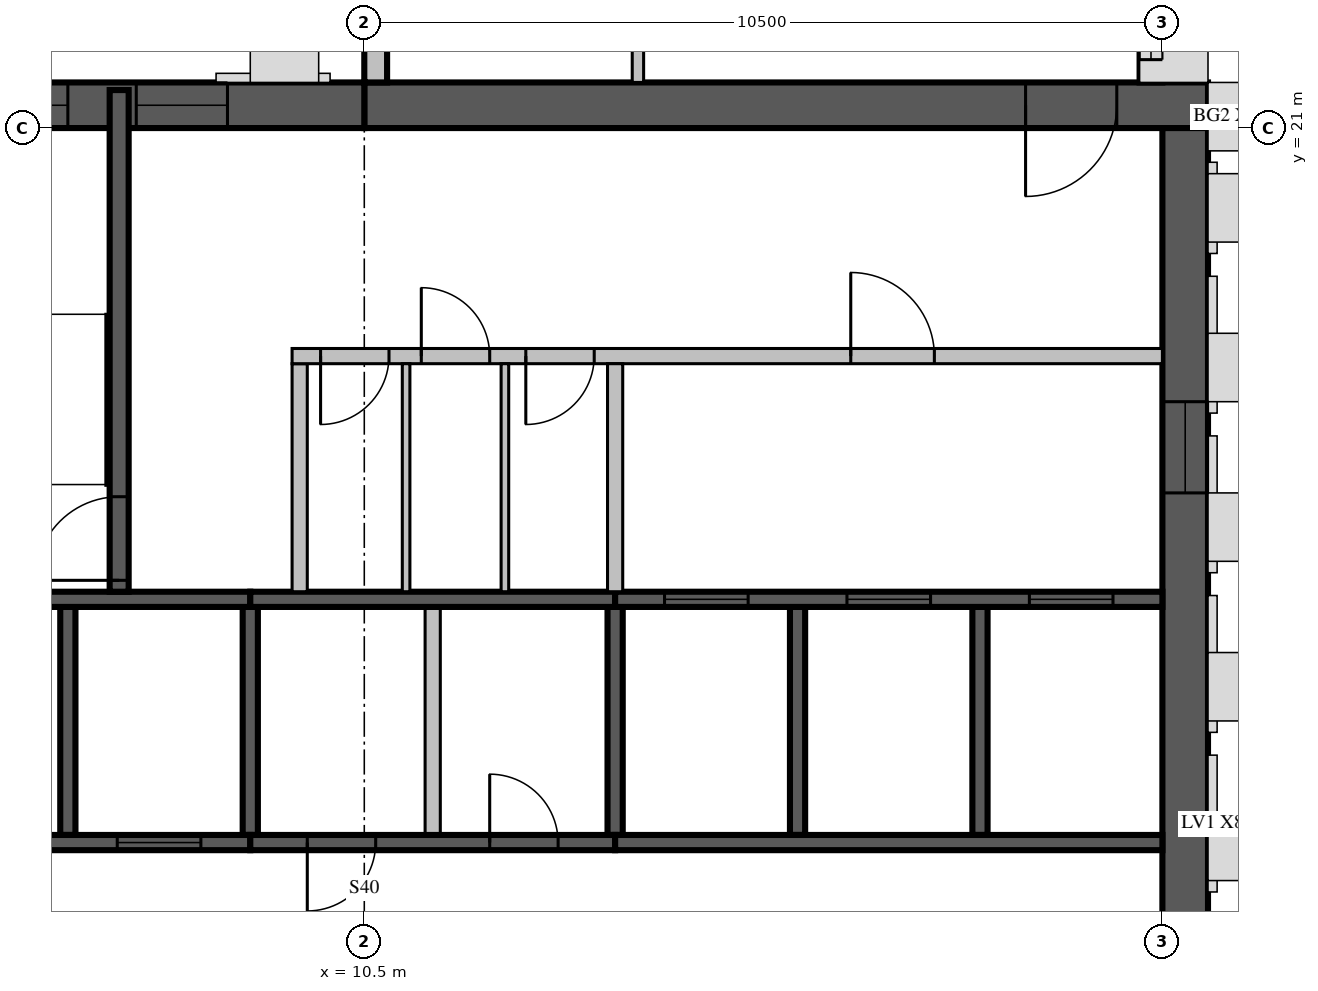
"""IFC4 building model, lengths in metres.
Left out: names, types, materials, properties, quantities, classifications, styles, units other than length and angle.
Written with IfcOpenShell. Run it as: python <this file> out.ifc"""

import sys

from ifc_helpers import new_model, si_unit, direction, frame, frame_2d, origin, place, context, subcontext, project, spatial, rectangle, extrude, source, transform, mapped, element, fill, save


model = new_model("IFC4")
c1 = context("Model", 3, precision=1e-05, world=origin(), true_north=direction((0.0, 1.0)))
c2 = subcontext(c1, "Body", "Model", "MODEL_VIEW")
j1 = project(units=[si_unit("LENGTHUNIT", "METRE"), si_unit("PLANEANGLEUNIT", "RADIAN")], contexts=[c1])
p1 = place(None, origin())
s1 = spatial("IfcSite", under=j1, at=p1, CompositionType="ELEMENT")
p2 = place(p1, origin())
s2 = spatial("IfcBuilding", under=s1, at=p2, CompositionType="ELEMENT")
p3 = place(p2, frame((0.0, 0.0, 354.5)))
s3 = spatial("IfcBuildingStorey", under=s2, at=p3, CompositionType="ELEMENT", Elevation=354.5)
m1 = source(origin(), c2, "Body", "SweptSolid", [
    extrude(rectangle(XDim=11.1, YDim=0.6, at=frame_2d((5.55, 0.0))), origin(), (0.0, 0.0, 1.0), 3.5),
])
p4 = place(p3, frame((10.5, 21.3, 0.0), z_axis=(0.0, 0.0, 1.0), x_axis=(1.0, 0.0, 0.0)))
e1 = element("IfcWall", 1, at=p4, inside=s3, PredefinedType="SHEAR", context=c2, shape_type="MappedRepresentation", body=[
    mapped(m1, transform((0.0, 0.0, 0.0), scale=1.0)),
])
m2 = source(origin(), c2, "Body", "SweptSolid", [
    extrude(rectangle(XDim=1.2, YDim=2.1, at=frame_2d((0.6, 1.05))), frame((0.0, 0.31, 0.0), z_axis=(0.0, -1.0, 0.0), x_axis=(1.0, 0.0, 0.0)), (0.0, 0.0, 1.0), 0.62),
])
p5 = place(p4, frame((8.7, 0.0, 0.0)))
e2 = element("IfcOpeningElement", 2, at=p5, cuts=e1, PredefinedType="OPENING", context=c2, shape_type="MappedRepresentation", body=[
    mapped(m2, transform((0.0, 0.0, 0.0), scale=1.0)),
])
m3 = source(origin(), c2, "Body", "SweptSolid", [
    extrude(rectangle(XDim=10.5, YDim=0.6, at=frame_2d((5.25, 0.0))), origin(), (0.0, 0.0, 1.0), 3.5),
])
p6 = place(p3, frame((21.3, 10.5, 0.0), z_axis=(0.0, 0.0, 1.0), x_axis=(0.0, 1.0, 0.0)))
e3 = element("IfcWall", 3, at=p6, inside=s3, PredefinedType="SHEAR", context=c2, shape_type="MappedRepresentation", body=[
    mapped(m3, transform((0.0, 0.0, 0.0), scale=1.0)),
])
m4 = source(origin(), c2, "Body", "SweptSolid", [
    extrude(rectangle(XDim=1.2, YDim=2.4, at=frame_2d((0.6, 1.2))), frame((0.0, 0.31, 0.0), z_axis=(0.0, -1.0, 0.0), x_axis=(1.0, 0.0, 0.0)), (0.0, 0.0, 1.0), 0.62),
])
p7 = place(p6, frame((5.7, 0.0, 0.6)))
e4 = element("IfcOpeningElement", 4, at=p7, cuts=e3, PredefinedType="OPENING", context=c2, shape_type="MappedRepresentation", body=[
    mapped(m4, transform((0.0, 0.0, 0.0), scale=1.0)),
])
m5 = source(origin(), c2, "Body", "SweptSolid", [
    extrude(rectangle(XDim=6.6, YDim=0.6, at=frame_2d((3.3, 0.0))), origin(), (0.0, 0.0, 1.0), 3.5),
])
p8 = place(p3, frame((3.9, 21.3, 0.0), z_axis=(0.0, 0.0, 1.0), x_axis=(1.0, 0.0, 0.0)))
e5 = element("IfcWall", 5, at=p8, inside=s3, PredefinedType="SHEAR", context=c2, shape_type="MappedRepresentation", body=[
    mapped(m5, transform((0.0, 0.0, 0.0), scale=1.0)),
])
p9 = place(p8, frame((1.5, 0.0, 0.6)))
e6 = element("IfcOpeningElement", 6, at=p9, cuts=e5, PredefinedType="OPENING", context=c2, shape_type="MappedRepresentation", body=[
    mapped(m4, transform((0.0, 0.0, 0.0), scale=1.0)),
])
p10 = place(p8, frame((3.6, 0.0, 0.6)))
e7 = element("IfcOpeningElement", 7, at=p10, cuts=e5, PredefinedType="OPENING", context=c2, shape_type="MappedRepresentation", body=[
    mapped(m4, transform((0.0, 0.0, 0.0), scale=1.0)),
])
m6 = source(origin(), c2, "Body", "SweptSolid", [
    extrude(rectangle(XDim=7.5, YDim=0.3, at=frame_2d((3.75, 0.0))), origin(), (0.0, 0.0, 1.0), 3.1),
])
p11 = place(p3, frame((20.85, 21.6, 0.0), z_axis=(0.0, 0.0, 1.0), x_axis=(0.0, 1.0, 0.0)))
e8 = element("IfcWall", 8, at=p11, inside=s3, PredefinedType="STANDARD", context=c2, shape_type="MappedRepresentation", body=[
    mapped(m6, transform((0.0, 0.0, 0.0), scale=1.0)),
])
m7 = source(origin(), c2, "Body", "SweptSolid", [
    extrude(rectangle(XDim=2.4, YDim=2.0, at=frame_2d((1.2, 1.0))), frame((0.0, 0.16, 0.0), z_axis=(0.0, -1.0, 0.0), x_axis=(1.0, 0.0, 0.0)), (0.0, 0.0, 1.0), 0.32),
])
p12 = place(p11, frame((0.3, 0.0, 0.6)))
e9 = element("IfcOpeningElement", 9, at=p12, cuts=e8, PredefinedType="OPENING", context=c2, shape_type="MappedRepresentation", body=[
    mapped(m7, transform((0.0, 0.0, 0.0), scale=1.0)),
])
m8 = source(origin(), c2, "Body", "SweptSolid", [
    extrude(rectangle(XDim=3.0, YDim=2.0, at=frame_2d((1.5, 1.0))), frame((0.0, 0.16, 0.0), z_axis=(0.0, -1.0, 0.0), x_axis=(1.0, 0.0, 0.0)), (0.0, 0.0, 1.0), 0.32),
])
p13 = place(p11, frame((4.2, 0.0, 0.6)))
e10 = element("IfcOpeningElement", 10, at=p13, cuts=e8, PredefinedType="OPENING", context=c2, shape_type="MappedRepresentation", body=[
    mapped(m8, transform((0.0, 0.0, 0.0), scale=1.0)),
])
p14 = place(p3, frame((10.65, 29.1, 0.0), z_axis=(0.0, 0.0, 1.0), x_axis=(0.0, -1.0, 0.0)))
e11 = element("IfcWall", 11, at=p14, inside=s3, PredefinedType="STANDARD", context=c2, shape_type="MappedRepresentation", body=[
    mapped(m6, transform((0.0, 0.0, 0.0), scale=1.0)),
])
m9 = source(origin(), c2, "Body", "SweptSolid", [
    extrude(rectangle(XDim=3.6, YDim=2.0, at=frame_2d((1.8, 1.0))), frame((0.0, 0.16, 0.0), z_axis=(0.0, -1.0, 0.0), x_axis=(1.0, 0.0, 0.0)), (0.0, 0.0, 1.0), 0.32),
])
p15 = place(p14, frame((3.36, 0.0, 0.6)))
e12 = element("IfcOpeningElement", 12, at=p15, cuts=e11, PredefinedType="OPENING", context=c2, shape_type="MappedRepresentation", body=[
    mapped(m9, transform((0.0, 0.0, 0.0), scale=1.0)),
])
p16 = place(p14, frame((0.48, 0.0, 0.6)))
e13 = element("IfcOpeningElement", 13, at=p16, cuts=e11, PredefinedType="OPENING", context=c2, shape_type="MappedRepresentation", body=[
    mapped(m7, transform((0.0, 0.0, 0.0), scale=1.0)),
])
m10 = source(origin(), c2, "Body", "SweptSolid", [
    extrude(rectangle(XDim=3.0, YDim=0.2, at=frame_2d((1.5, 0.0))), origin(), (0.0, 0.0, 1.0), 3.5),
])
p17 = place(p3, frame((6.6, 11.7, 0.0), z_axis=(0.0, 0.0, 1.0), x_axis=(0.0, 1.0, 0.0)))
e14 = element("IfcWall", 14, at=p17, inside=s3, PredefinedType="SOLIDWALL", context=c2, shape_type="MappedRepresentation", body=[
    mapped(m10, transform((0.0, 0.0, 0.0), scale=1.0)),
])
m11 = source(origin(), c2, "Body", "SweptSolid", [
    extrude(rectangle(XDim=3.0, YDim=0.2, at=frame_2d((1.5, 0.0))), origin(), (0.0, 0.0, 1.0), 3.1),
])
for number, where, z_axis, x_axis in (
    (15, (9.0, 11.7, 0.0), (0.0, 0.0, 1.0), (0.0, 1.0, 0.0)),
    (16, (13.8, 11.7, 0.0), (0.0, 0.0, 1.0), (0.0, 1.0, 0.0)),
):
    element("IfcWall", number, at=place(p3, frame(where, z_axis=z_axis, x_axis=x_axis)), inside=s3, PredefinedType="SOLIDWALL", context=c2, shape_type="MappedRepresentation", body=[
        mapped(m11, transform((0.0, 0.0, 0.0), scale=1.0)),
    ])
for number, where, z_axis, x_axis in (
    (17, (16.2, 11.7, 0.0), (0.0, 0.0, 1.0), (0.0, 1.0, 0.0)),
    (18, (18.6, 11.7, 0.0), (0.0, 0.0, 1.0), (0.0, 1.0, 0.0)),
):
    element("IfcWall", number, at=place(p3, frame(where, z_axis=z_axis, x_axis=x_axis)), inside=s3, PredefinedType="SOLIDWALL", context=c2, shape_type="MappedRepresentation", body=[
        mapped(m10, transform((0.0, 0.0, 0.0), scale=1.0)),
    ])
m12 = source(origin(), c2, "Body", "SweptSolid", [
    extrude(rectangle(XDim=3.0, YDim=0.2, at=frame_2d((1.5, 0.0))), origin(), (0.0, 0.0, 1.0), 3.1),
])
p18 = place(p3, frame((11.4, 11.7, 0.0), z_axis=(0.0, 0.0, 1.0), x_axis=(0.0, 1.0, 0.0)))
e19 = element("IfcWall", 19, at=p18, inside=s3, PredefinedType="PARTITIONING", context=c2, shape_type="MappedRepresentation", body=[
    mapped(m12, transform((0.0, 0.0, 0.0), scale=1.0)),
])
m13 = source(origin(), c2, "Body", "SweptSolid", [
    extrude(rectangle(XDim=4.8, YDim=0.2, at=frame_2d((2.4, 0.0))), origin(), (0.0, 0.0, 1.0), 3.5),
])
p19 = place(p3, frame((4.2, 11.6, 0.0), z_axis=(0.0, 0.0, 1.0), x_axis=(1.0, 0.0, 0.0)))
e20 = element("IfcWall", 20, at=p19, inside=s3, PredefinedType="SOLIDWALL", context=c2, shape_type="MappedRepresentation", body=[
    mapped(m13, transform((0.0, 0.0, 0.0), scale=1.0)),
])
m14 = source(origin(), c2, "Body", "SweptSolid", [
    extrude(rectangle(XDim=1.1, YDim=2.1, at=frame_2d((0.55, 1.05))), frame((0.0, 0.11, 0.0), z_axis=(0.0, -1.0, 0.0), x_axis=(1.0, 0.0, 0.0)), (0.0, 0.0, 1.0), 0.22),
])
p20 = place(p19, frame((0.65, 0.0, 0.0)))
e21 = element("IfcOpeningElement", 21, at=p20, cuts=e20, PredefinedType="OPENING", context=c2, shape_type="MappedRepresentation", body=[
    mapped(m14, transform((0.0, 0.0, 0.0), scale=1.0)),
])
p21 = place(p19, frame((3.05, 0.0, 0.0)))
e22 = element("IfcOpeningElement", 22, at=p21, cuts=e20, PredefinedType="OPENING", context=c2, shape_type="MappedRepresentation", body=[
    mapped(m14, transform((0.0, 0.0, 0.0), scale=1.0)),
])
m15 = source(origin(), c2, "Body", "SweptSolid", [
    extrude(rectangle(XDim=4.8, YDim=0.2, at=frame_2d((2.4, 0.0))), origin(), (0.0, 0.0, 1.0), 3.1),
])
p22 = place(p3, frame((9.0, 11.6, 0.0), z_axis=(0.0, 0.0, 1.0), x_axis=(1.0, 0.0, 0.0)))
e23 = element("IfcWall", 23, at=p22, inside=s3, PredefinedType="SOLIDWALL", context=c2, shape_type="MappedRepresentation", body=[
    mapped(m15, transform((0.0, 0.0, 0.0), scale=1.0)),
])
m16 = source(origin(), c2, "Body", "SweptSolid", [
    extrude(rectangle(XDim=0.9, YDim=2.1, at=frame_2d((0.45, 1.05))), frame((0.0, 0.11, 0.0), z_axis=(0.0, -1.0, 0.0), x_axis=(1.0, 0.0, 0.0)), (0.0, 0.0, 1.0), 0.22),
])
p23 = place(p22, frame((0.75, 0.0, 0.0)))
e24 = element("IfcOpeningElement", 24, at=p23, cuts=e23, PredefinedType="OPENING", context=c2, shape_type="MappedRepresentation", body=[
    mapped(m16, transform((0.0, 0.0, 0.0), scale=1.0)),
])
p24 = place(p22, frame((3.15, 0.0, 0.0)))
e25 = element("IfcOpeningElement", 25, at=p24, cuts=e23, PredefinedType="OPENING", context=c2, shape_type="MappedRepresentation", body=[
    mapped(m16, transform((0.0, 0.0, 0.0), scale=1.0)),
])
m17 = source(origin(), c2, "Body", "SweptSolid", [
    extrude(rectangle(XDim=7.2, YDim=0.2, at=frame_2d((3.6, 0.0))), origin(), (0.0, 0.0, 1.0), 3.5),
])
p25 = place(p3, frame((13.8, 11.6, 0.0), z_axis=(0.0, 0.0, 1.0), x_axis=(1.0, 0.0, 0.0)))
e26 = element("IfcWall", 26, at=p25, inside=s3, PredefinedType="SOLIDWALL", context=c2, shape_type="MappedRepresentation", body=[
    mapped(m17, transform((0.0, 0.0, 0.0), scale=1.0)),
])
p26 = place(p3, frame((4.2, 14.8, 0.0), z_axis=(0.0, 0.0, 1.0), x_axis=(1.0, 0.0, 0.0)))
e27 = element("IfcWall", 27, at=p26, inside=s3, PredefinedType="SOLIDWALL", context=c2, shape_type="MappedRepresentation", body=[
    mapped(m13, transform((0.0, 0.0, 0.0), scale=1.0)),
])
p27 = place(p3, frame((9.0, 14.8, 0.0), z_axis=(0.0, 0.0, 1.0), x_axis=(1.0, 0.0, 0.0)))
e28 = element("IfcWall", 28, at=p27, inside=s3, PredefinedType="SOLIDWALL", context=c2, shape_type="MappedRepresentation", body=[
    mapped(m15, transform((0.0, 0.0, 0.0), scale=1.0)),
])
p28 = place(p3, frame((13.8, 14.8, 0.0), z_axis=(0.0, 0.0, 1.0), x_axis=(1.0, 0.0, 0.0)))
e29 = element("IfcWall", 29, at=p28, inside=s3, PredefinedType="SOLIDWALL", context=c2, shape_type="MappedRepresentation", body=[
    mapped(m17, transform((0.0, 0.0, 0.0), scale=1.0)),
])
p29 = place(p28, frame((0.65, 0.0, 0.0)))
e30 = element("IfcOpeningElement", 30, at=p29, cuts=e29, PredefinedType="OPENING", context=c2, shape_type="MappedRepresentation", body=[
    mapped(m14, transform((0.0, 0.0, 0.0), scale=1.0)),
])
p30 = place(p28, frame((3.05, 0.0, 0.0)))
e31 = element("IfcOpeningElement", 31, at=p30, cuts=e29, PredefinedType="OPENING", context=c2, shape_type="MappedRepresentation", body=[
    mapped(m14, transform((0.0, 0.0, 0.0), scale=1.0)),
])
p31 = place(p28, frame((5.45, 0.0, 0.0)))
e32 = element("IfcOpeningElement", 32, at=p31, cuts=e29, PredefinedType="OPENING", context=c2, shape_type="MappedRepresentation", body=[
    mapped(m14, transform((0.0, 0.0, 0.0), scale=1.0)),
])
m18 = source(origin(), c2, "Body", "SweptSolid", [
    extrude(rectangle(XDim=6.6, YDim=0.25, at=frame_2d((3.3, 0.0))), origin(), (0.0, 0.0, 1.0), 3.1),
])
p32 = place(p3, frame((7.275, 14.9, 0.0), z_axis=(0.0, 0.0, 1.0), x_axis=(0.0, 1.0, 0.0)))
e33 = element("IfcWall", 33, at=p32, inside=s3, PredefinedType="SOLIDWALL", context=c2, shape_type="MappedRepresentation", body=[
    mapped(m18, transform((0.0, 0.0, 0.0), scale=1.0)),
])
m19 = source(origin(), c2, "Body", "SweptSolid", [
    extrude(rectangle(XDim=1.1, YDim=2.1, at=frame_2d((0.55, 1.05))), frame((0.0, 0.135, 0.0), z_axis=(0.0, -1.0, 0.0), x_axis=(1.0, 0.0, 0.0)), (0.0, 0.0, 1.0), 0.27),
])
p33 = place(p32, frame((0.15, 0.0, 0.0)))
e34 = element("IfcOpeningElement", 34, at=p33, cuts=e33, PredefinedType="OPENING", context=c2, shape_type="MappedRepresentation", body=[
    mapped(m19, transform((0.0, 0.0, 0.0), scale=1.0)),
])
p34 = place(p3, frame((9.65, 14.9, 0.0), z_axis=(0.0, 0.0, 1.0), x_axis=(0.0, 1.0, 0.0)))
e35 = element("IfcWall", 35, at=p34, inside=s3, PredefinedType="PARTITIONING", context=c2, shape_type="MappedRepresentation", body=[
    mapped(m12, transform((0.0, 0.0, 0.0), scale=1.0)),
])
m20 = source(origin(), c2, "Body", "SweptSolid", [
    extrude(rectangle(XDim=11.45, YDim=0.2, at=frame_2d((5.725, 0.0))), origin(), (0.0, 0.0, 1.0), 3.1),
])
p35 = place(p3, frame((9.55, 18.0, 0.0), z_axis=(0.0, 0.0, 1.0), x_axis=(1.0, 0.0, 0.0)))
e36 = element("IfcWall", 36, at=p35, inside=s3, PredefinedType="PARTITIONING", context=c2, shape_type="MappedRepresentation", body=[
    mapped(m20, transform((0.0, 0.0, 0.0), scale=1.0)),
])
p36 = place(p35, frame((0.375, 0.0, 0.0)))
e37 = element("IfcOpeningElement", 37, at=p36, cuts=e36, PredefinedType="OPENING", context=c2, shape_type="MappedRepresentation", body=[
    mapped(m16, transform((0.0, 0.0, 0.0), scale=1.0)),
])
p37 = place(p35, frame((1.7, 0.0, 0.0)))
e38 = element("IfcOpeningElement", 38, at=p37, cuts=e36, PredefinedType="OPENING", context=c2, shape_type="MappedRepresentation", body=[
    mapped(m16, transform((0.0, 0.0, 0.0), scale=1.0)),
])
p38 = place(p35, frame((3.075, 0.0, 0.0)))
e39 = element("IfcOpeningElement", 39, at=p38, cuts=e36, PredefinedType="OPENING", context=c2, shape_type="MappedRepresentation", body=[
    mapped(m16, transform((0.0, 0.0, 0.0), scale=1.0)),
])
p39 = place(p35, frame((7.35, 0.0, 0.0)))
e40 = element("IfcOpeningElement", 40, at=p39, cuts=e36, PredefinedType="OPENING", context=c2, shape_type="MappedRepresentation", body=[
    mapped(m14, transform((0.0, 0.0, 0.0), scale=1.0)),
])
p40 = place(p3, frame((13.8, 14.9, 0.0), z_axis=(0.0, 0.0, 1.0), x_axis=(0.0, 1.0, 0.0)))
e41 = element("IfcWall", 41, at=p40, inside=s3, PredefinedType="PARTITIONING", context=c2, shape_type="MappedRepresentation", body=[
    mapped(m12, transform((0.0, 0.0, 0.0), scale=1.0)),
])
m21 = source(origin(), c2, "Body", "SweptSolid", [
    extrude(rectangle(XDim=3.0, YDim=0.1, at=frame_2d((1.5, 0.0))), origin(), (0.0, 0.0, 1.0), 3.1),
])
for number, where, z_axis, x_axis in (
    (42, (11.05, 14.9, 0.0), (0.0, 0.0, 1.0), (0.0, 1.0, 0.0)),
    (43, (12.35, 14.9, 0.0), (0.0, 0.0, 1.0), (0.0, 1.0, 0.0)),
):
    element("IfcWall", number, at=place(p3, frame(where, z_axis=z_axis, x_axis=x_axis)), inside=s3, PredefinedType="PARTITIONING", context=c2, shape_type="MappedRepresentation", body=[
        mapped(m21, transform((0.0, 0.0, 0.0), scale=1.0)),
    ])
m22 = source(origin(), c2, "Body", "SweptSolid", [
    extrude(rectangle(XDim=7.725, YDim=0.15, at=frame_2d((3.862, 0.0))), origin(), (0.0, 0.0, 1.0), 3.1),
])
p41 = place(p3, frame((14.1, 29.325, 0.0), z_axis=(0.0, 0.0, 1.0), x_axis=(0.0, -1.0, 0.0)))
e44 = element("IfcWall", 44, at=p41, inside=s3, PredefinedType="PARTITIONING", context=c2, shape_type="MappedRepresentation", body=[
    mapped(m22, transform((0.0, 0.0, 0.0), scale=1.0)),
])
m23 = source(origin(), c2, "Body", "SweptSolid", [
    extrude(rectangle(XDim=2.2, YDim=2.1, at=frame_2d((1.1, 1.05))), frame((0.0, 0.085, 0.0), z_axis=(0.0, -1.0, 0.0), x_axis=(1.0, 0.0, 0.0)), (0.0, 0.0, 1.0), 0.17),
])
p42 = place(p41, frame((4.925, 0.0, 0.0)))
e45 = element("IfcOpeningElement", 45, at=p42, cuts=e44, PredefinedType="OPENING", context=c2, shape_type="MappedRepresentation", body=[
    mapped(m23, transform((0.0, 0.0, 0.0), scale=1.0)),
])
m24 = source(origin(), c2, "Body", "SweptSolid", [
    extrude(rectangle(XDim=2.4, YDim=2.0, at=frame_2d((1.2, 1.0))), frame((0.0, 0.03, 0.0), z_axis=(0.0, -1.0, 0.0), x_axis=(1.0, 0.0, 0.0)), (0.0, 0.0, 1.0), 0.06),
])
p43 = place(p12, origin())
e46 = element("IfcWindow", 46, at=p43, inside=s3, PartitioningType="SINGLE_PANEL", PredefinedType="WINDOW", context=c2, shape_type="MappedRepresentation", body=[
    mapped(m24, transform((0.0, 0.0, 0.0), scale=1.0)),
])
fill(e9, e46)
m25 = source(origin(), c2, "Body", "SweptSolid", [
    extrude(rectangle(XDim=1.1, YDim=2.1, at=frame_2d((0.55, 1.05))), frame((0.0, 0.025, 0.0), z_axis=(0.0, -1.0, 0.0), x_axis=(1.0, 0.0, 0.0)), (0.0, 0.0, 1.0), 0.05),
])
p44 = place(p21, origin())
e47 = element("IfcDoor", 47, at=p44, inside=s3, OperationType="SLIDING_TO_LEFT", PredefinedType="DOOR", context=c2, shape_type="MappedRepresentation", body=[
    mapped(m25, transform((0.0, 0.0, 0.0), scale=1.0)),
])
fill(e22, e47)
m26 = source(origin(), c2, "Body", "SweptSolid", [
    extrude(rectangle(XDim=0.9, YDim=2.1, at=frame_2d((0.45, 1.05))), frame((0.0, 0.025, 0.0), z_axis=(0.0, -1.0, 0.0), x_axis=(1.0, 0.0, 0.0)), (0.0, 0.0, 1.0), 0.05),
])
p45 = place(p23, origin())
e48 = element("IfcDoor", 48, at=p45, inside=s3, OperationType="SINGLE_SWING_RIGHT", PredefinedType="DOOR", context=c2, shape_type="MappedRepresentation", body=[
    mapped(m26, transform((0.0, 0.0, 0.0), scale=1.0)),
])
fill(e24, e48)
p46 = place(p24, origin())
e49 = element("IfcDoor", 49, at=p46, inside=s3, OperationType="SINGLE_SWING_LEFT", PredefinedType="DOOR", context=c2, shape_type="MappedRepresentation", body=[
    mapped(m26, transform((0.0, 0.0, 0.0), scale=1.0)),
])
fill(e25, e49)
p47 = place(p29, origin())
e50 = element("IfcDoor", 50, at=p47, inside=s3, OperationType="SLIDING_TO_LEFT", PredefinedType="DOOR", context=c2, shape_type="MappedRepresentation", body=[
    mapped(m25, transform((0.0, 0.0, 0.0), scale=1.0)),
])
fill(e30, e50)
p48 = place(p30, origin())
e51 = element("IfcDoor", 51, at=p48, inside=s3, OperationType="SLIDING_TO_LEFT", PredefinedType="DOOR", context=c2, shape_type="MappedRepresentation", body=[
    mapped(m25, transform((0.0, 0.0, 0.0), scale=1.0)),
])
fill(e31, e51)
p49 = place(p31, origin())
e52 = element("IfcDoor", 52, at=p49, inside=s3, OperationType="SLIDING_TO_LEFT", PredefinedType="DOOR", context=c2, shape_type="MappedRepresentation", body=[
    mapped(m25, transform((0.0, 0.0, 0.0), scale=1.0)),
])
fill(e32, e52)
p50 = place(p33, origin())
e53 = element("IfcDoor", 53, at=p50, inside=s3, OperationType="SINGLE_SWING_LEFT", PredefinedType="DOOR", context=c2, shape_type="MappedRepresentation", body=[
    mapped(m25, transform((0.0, 0.0, 0.0), scale=1.0)),
])
fill(e34, e53)
p51 = place(p36, origin())
e54 = element("IfcDoor", 54, at=p51, inside=s3, OperationType="SINGLE_SWING_RIGHT", PredefinedType="DOOR", context=c2, shape_type="MappedRepresentation", body=[
    mapped(m26, transform((0.0, 0.0, 0.0), scale=1.0)),
])
fill(e37, e54)
p52 = place(p37, origin())
e55 = element("IfcDoor", 55, at=p52, inside=s3, OperationType="SINGLE_SWING_LEFT", PredefinedType="DOOR", context=c2, shape_type="MappedRepresentation", body=[
    mapped(m26, transform((0.0, 0.0, 0.0), scale=1.0)),
])
fill(e38, e55)
p53 = place(p38, origin())
e56 = element("IfcDoor", 56, at=p53, inside=s3, OperationType="SINGLE_SWING_RIGHT", PredefinedType="DOOR", context=c2, shape_type="MappedRepresentation", body=[
    mapped(m26, transform((0.0, 0.0, 0.0), scale=1.0)),
])
fill(e39, e56)
p54 = place(p39, origin())
e57 = element("IfcDoor", 57, at=p54, inside=s3, OperationType="SINGLE_SWING_LEFT", PredefinedType="DOOR", context=c2, shape_type="MappedRepresentation", body=[
    mapped(m25, transform((0.0, 0.0, 0.0), scale=1.0)),
])
fill(e40, e57)
m27 = source(origin(), c2, "Body", "SweptSolid", [
    extrude(rectangle(XDim=1.2, YDim=2.1, at=frame_2d((0.6, 1.05))), frame((0.0, 0.025, 0.0), z_axis=(0.0, -1.0, 0.0), x_axis=(1.0, 0.0, 0.0)), (0.0, 0.0, 1.0), 0.05),
])
p55 = place(p5, origin())
e58 = element("IfcDoor", 58, at=p55, inside=s3, OperationType="SINGLE_SWING_RIGHT", PredefinedType="DOOR", context=c2, shape_type="MappedRepresentation", body=[
    mapped(m27, transform((0.0, 0.0, 0.0), scale=1.0)),
])
fill(e2, e58)
m28 = source(origin(), c2, "Body", "SweptSolid", [
    extrude(rectangle(XDim=1.2, YDim=2.4, at=frame_2d((0.6, 1.2))), frame((0.0, 0.03, 0.0), z_axis=(0.0, -1.0, 0.0), x_axis=(1.0, 0.0, 0.0)), (0.0, 0.0, 1.0), 0.06),
])
p56 = place(p7, origin())
e59 = element("IfcWindow", 59, at=p56, inside=s3, PartitioningType="SINGLE_PANEL", PredefinedType="WINDOW", context=c2, shape_type="MappedRepresentation", body=[
    mapped(m28, transform((0.0, 0.0, 0.0), scale=1.0)),
])
fill(e4, e59)
p57 = place(p9, origin())
e60 = element("IfcWindow", 60, at=p57, inside=s3, PartitioningType="SINGLE_PANEL", PredefinedType="WINDOW", context=c2, shape_type="MappedRepresentation", body=[
    mapped(m28, transform((0.0, 0.0, 0.0), scale=1.0)),
])
fill(e6, e60)
p58 = place(p10, origin())
e61 = element("IfcWindow", 61, at=p58, inside=s3, PartitioningType="SINGLE_PANEL", PredefinedType="WINDOW", context=c2, shape_type="MappedRepresentation", body=[
    mapped(m28, transform((0.0, 0.0, 0.0), scale=1.0)),
])
fill(e7, e61)
save(model, sys.argv[1])
